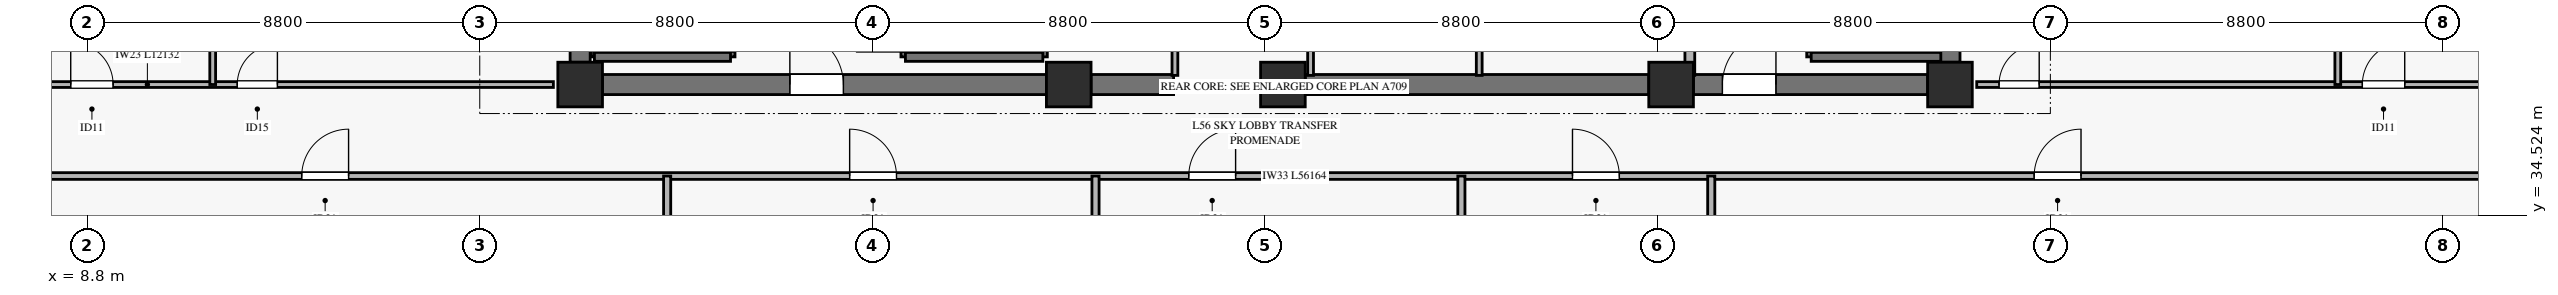
"""IFC4 building model, lengths in metres.
Left out: names, types, materials, properties, quantities, classifications, styles, units other than length and angle.
Written with IfcOpenShell. Run it as: python <this file> out.ifc"""

import sys

from ifc_helpers import new_model, si_unit, direction, frame, frame_2d, origin, origin_2d, place, context, subcontext, project, spatial, rectangle, extrude, source, transform, mapped, element, fill, save


model = new_model("IFC4")
c1 = context("Model", 3, precision=1e-05, world=origin(), true_north=direction((0.0, 1.0)))
c2 = subcontext(c1, "Body", "Model", "MODEL_VIEW")
j1 = project(units=[si_unit("LENGTHUNIT", "METRE"), si_unit("PLANEANGLEUNIT", "RADIAN")], contexts=[c1])
p1 = place(None, origin())
s1 = spatial("IfcSite", under=j1, at=p1, CompositionType="ELEMENT")
p2 = place(p1, origin())
s2 = spatial("IfcBuilding", under=s1, at=p2, CompositionType="ELEMENT")
p3 = place(p2, frame((0.0, 0.0, 220.2)))
s3 = spatial("IfcBuildingStorey", under=s2, at=p3, CompositionType="ELEMENT", Elevation=220.2)
m1 = source(origin(), c2, "Body", "SweptSolid", [
    extrude(rectangle(XDim=1.0, YDim=1.0, at=origin_2d()), origin(), (0.0, 0.0, 1.0), 6.585),
])
for number, where, z_axis, x_axis in (
    (1, (19.85, 37.45, 0.0), (0.0, 0.0, 1.0), (1.0, 0.0, 0.0)),
    (2, (30.8, 37.45, 0.0), (0.0, 0.0, 1.0), (1.0, 0.0, 0.0)),
    (3, (35.6, 37.45, 0.0), (0.0, 0.0, 1.0), (1.0, 0.0, 0.0)),
    (4, (44.3, 37.45, 0.0), (0.0, 0.0, 1.0), (1.0, 0.0, 0.0)),
    (5, (50.55, 37.45, 0.0), (0.0, 0.0, 1.0), (1.0, 0.0, 0.0)),
):
    element("IfcColumn", number, at=place(p3, frame(where, z_axis=z_axis, x_axis=x_axis)), inside=s3, PredefinedType="PILASTER", context=c2, shape_type="MappedRepresentation", body=[
        mapped(m1, transform((0.0, 0.0, 0.0), x_axis=(1.0, 0.0, 0.0), y_axis=(0.0, 1.0, 0.0), z_axis=(0.0, 0.0, 1.0), scale=1.0)),
    ])
p4 = place(p3, frame((20.35, 37.45, 0.0), z_axis=(0.0, 0.0, 1.0), x_axis=(1.0, 0.0, 0.0)))
e6 = element("IfcWall", 6, at=p4, inside=s3, PredefinedType="SHEAR", context=c2, shape_type="SweptSolid", body=[
    extrude(rectangle(XDim=9.95, YDim=0.45, at=frame_2d((4.975, 0.0))), origin(), (0.0, 0.0, 1.0), 6.585),
])
p5 = place(p4, frame((4.2, 0.0, 0.0)))
e7 = element("IfcOpeningElement", 7, at=p5, cuts=e6, PredefinedType="OPENING", context=c2, shape_type="SweptSolid", body=[
    extrude(rectangle(XDim=1.2, YDim=2.15, at=frame_2d((0.6, 1.075))), frame((0.0, 0.235, 0.0), z_axis=(0.0, -1.0, 0.0), x_axis=(1.0, 0.0, 0.0)), (0.0, 0.0, 1.0), 0.47),
])
p6 = place(p3, frame((31.3, 37.45, 0.0), z_axis=(0.0, 0.0, 1.0), x_axis=(1.0, 0.0, 0.0)))
e8 = element("IfcWall", 8, at=p6, inside=s3, PredefinedType="SHEAR", context=c2, shape_type="SweptSolid", body=[
    extrude(rectangle(XDim=1.85, YDim=0.45, at=frame_2d((0.925, 0.0))), origin(), (0.0, 0.0, 1.0), 6.585),
])
p7 = place(p3, frame((36.1, 37.45, 0.0), z_axis=(0.0, 0.0, 1.0), x_axis=(1.0, 0.0, 0.0)))
e9 = element("IfcWall", 9, at=p7, inside=s3, PredefinedType="SHEAR", context=c2, shape_type="SweptSolid", body=[
    extrude(rectangle(XDim=7.7, YDim=0.45, at=frame_2d((3.85, 0.0))), origin(), (0.0, 0.0, 1.0), 6.585),
])
p8 = place(p3, frame((44.8, 37.45, 0.0), z_axis=(0.0, 0.0, 1.0), x_axis=(1.0, 0.0, 0.0)))
e10 = element("IfcWall", 10, at=p8, inside=s3, PredefinedType="SHEAR", context=c2, shape_type="SweptSolid", body=[
    extrude(rectangle(XDim=5.25, YDim=0.45, at=frame_2d((2.625, 0.0))), origin(), (0.0, 0.0, 1.0), 6.585),
])
p9 = place(p8, frame((0.65, 0.0, 0.0)))
e11 = element("IfcOpeningElement", 11, at=p9, cuts=e10, PredefinedType="OPENING", context=c2, shape_type="SweptSolid", body=[
    extrude(rectangle(XDim=1.2, YDim=2.15, at=frame_2d((0.6, 1.075))), frame((0.0, 0.235, 0.0), z_axis=(0.0, -1.0, 0.0), x_axis=(1.0, 0.0, 0.0)), (0.0, 0.0, 1.0), 0.47),
])
for number, where, z_axis, x_axis in (
    (12, (19.85, 37.95, 0.0), (0.0, 0.0, 1.0), (0.0, 1.0, 0.0)),
    (13, (50.55, 37.95, 0.0), (0.0, 0.0, 1.0), (0.0, 1.0, 0.0)),
):
    element("IfcWall", number, at=place(p3, frame(where, z_axis=z_axis, x_axis=x_axis)), inside=s3, PredefinedType="SHEAR", context=c2, shape_type="SweptSolid", body=[
        extrude(rectangle(XDim=8.1, YDim=0.45, at=frame_2d((4.05, 0.0))), origin(), (0.0, 0.0, 1.0), 6.585),
    ])
p10 = place(p3, frame((20.17, 38.07, 0.0), z_axis=(0.0, 0.0, 1.0), x_axis=(0.0, 1.0, 0.0)))
e14 = element("IfcWall", 14, at=p10, inside=s3, PredefinedType="SOLIDWALL", context=c2, shape_type="SweptSolid", body=[
    extrude(rectangle(XDim=7.25, YDim=0.14, at=frame_2d((3.625, 0.0))), origin(), (0.0, 0.0, 1.0), 6.8),
])
p11 = place(p3, frame((23.22, 38.07, 0.0), z_axis=(0.0, 0.0, 1.0), x_axis=(0.0, 1.0, 0.0)))
e15 = element("IfcWall", 15, at=p11, inside=s3, PredefinedType="SOLIDWALL", context=c2, shape_type="SweptSolid", body=[
    extrude(rectangle(XDim=7.25, YDim=0.2, at=frame_2d((3.625, 0.0))), origin(), (0.0, 0.0, 1.0), 6.8),
])
p12 = place(p11, frame((0.11, 0.0, 0.0)))
e16 = element("IfcOpeningElement", 16, at=p12, cuts=e15, PredefinedType="OPENING", context=c2, shape_type="SweptSolid", body=[
    extrude(rectangle(XDim=1.1, YDim=2.15, at=frame_2d((0.55, 1.075))), frame((0.0, 0.11, 0.0), z_axis=(0.0, -1.0, 0.0), x_axis=(1.0, 0.0, 0.0)), (0.0, 0.0, 1.0), 0.22),
])
p13 = place(p3, frame((20.17, 38.07, 0.0), z_axis=(0.0, 0.0, 1.0), x_axis=(1.0, 0.0, 0.0)))
e17 = element("IfcWall", 17, at=p13, inside=s3, PredefinedType="SOLIDWALL", context=c2, shape_type="SweptSolid", body=[
    extrude(rectangle(XDim=3.05, YDim=0.2, at=frame_2d((1.525, 0.0))), origin(), (0.0, 0.0, 1.0), 6.8),
])
p14 = place(p3, frame((27.14, 38.07, 0.0), z_axis=(0.0, 0.0, 1.0), x_axis=(0.0, 1.0, 0.0)))
e18 = element("IfcWall", 18, at=p14, inside=s3, PredefinedType="SOLIDWALL", context=c2, shape_type="SweptSolid", body=[
    extrude(rectangle(XDim=7.25, YDim=0.2, at=frame_2d((3.625, 0.0))), origin(), (0.0, 0.0, 1.0), 6.8),
])
p15 = place(p14, frame((0.11, 0.0, 0.0)))
e19 = element("IfcOpeningElement", 19, at=p15, cuts=e18, PredefinedType="OPENING", context=c2, shape_type="SweptSolid", body=[
    extrude(rectangle(XDim=1.1, YDim=2.15, at=frame_2d((0.55, 1.075))), frame((0.0, 0.11, 0.0), z_axis=(0.0, -1.0, 0.0), x_axis=(1.0, 0.0, 0.0)), (0.0, 0.0, 1.0), 0.22),
])
p16 = place(p3, frame((30.22, 38.07, 0.0), z_axis=(0.0, 0.0, 1.0), x_axis=(0.0, 1.0, 0.0)))
e20 = element("IfcWall", 20, at=p16, inside=s3, PredefinedType="SOLIDWALL", context=c2, shape_type="SweptSolid", body=[
    extrude(rectangle(XDim=7.25, YDim=0.2, at=frame_2d((3.625, 0.0))), origin(), (0.0, 0.0, 1.0), 6.8),
])
p17 = place(p3, frame((27.14, 38.07, 0.0), z_axis=(0.0, 0.0, 1.0), x_axis=(1.0, 0.0, 0.0)))
e21 = element("IfcWall", 21, at=p17, inside=s3, PredefinedType="SOLIDWALL", context=c2, shape_type="SweptSolid", body=[
    extrude(rectangle(XDim=3.08, YDim=0.2, at=frame_2d((1.54, 0.0))), origin(), (0.0, 0.0, 1.0), 6.8),
])
p18 = place(p3, frame((47.44, 38.07, 0.0), z_axis=(0.0, 0.0, 1.0), x_axis=(0.0, 1.0, 0.0)))
e22 = element("IfcWall", 22, at=p18, inside=s3, PredefinedType="SOLIDWALL", context=c2, shape_type="SweptSolid", body=[
    extrude(rectangle(XDim=7.25, YDim=0.2, at=frame_2d((3.625, 0.0))), origin(), (0.0, 0.0, 1.0), 6.8),
])
p19 = place(p18, frame((0.11, 0.0, 0.0)))
e23 = element("IfcOpeningElement", 23, at=p19, cuts=e22, PredefinedType="OPENING", context=c2, shape_type="SweptSolid", body=[
    extrude(rectangle(XDim=1.1, YDim=2.15, at=frame_2d((0.55, 1.075))), frame((0.0, 0.11, 0.0), z_axis=(0.0, -1.0, 0.0), x_axis=(1.0, 0.0, 0.0)), (0.0, 0.0, 1.0), 0.22),
])
p20 = place(p3, frame((47.44, 38.07, 0.0), z_axis=(0.0, 0.0, 1.0), x_axis=(1.0, 0.0, 0.0)))
e24 = element("IfcWall", 24, at=p20, inside=s3, PredefinedType="SOLIDWALL", context=c2, shape_type="SweptSolid", body=[
    extrude(rectangle(XDim=2.905, YDim=0.2, at=frame_2d((1.453, 0.0))), origin(), (0.0, 0.0, 1.0), 6.8),
])
p21 = place(p3, frame((44.72, 37.655, 0.0), z_axis=(0.0, 0.0, 1.0), x_axis=(0.0, 1.0, 0.0)))
e25 = element("IfcWall", 25, at=p21, inside=s3, PredefinedType="SOLIDWALL", context=c2, shape_type="SweptSolid", body=[
    extrude(rectangle(XDim=7.565, YDim=0.22, at=frame_2d((3.782, 0.0))), origin(), (0.0, 0.0, 1.0), 6.585),
])
p22 = place(p3, frame((33.18, 37.655, 0.0), z_axis=(0.0, 0.0, 1.0), x_axis=(0.0, 1.0, 0.0)))
e26 = element("IfcWall", 26, at=p22, inside=s3, PredefinedType="PARTITIONING", context=c2, shape_type="SweptSolid", body=[
    extrude(rectangle(XDim=6.495, YDim=0.13, at=frame_2d((3.248, 0.0))), origin(), (0.0, 0.0, 1.0), 5.67),
])
p23 = place(p22, frame((2.245, 0.0, 0.0)))
e27 = element("IfcOpeningElement", 27, at=p23, cuts=e26, PredefinedType="OPENING", context=c2, shape_type="SweptSolid", body=[
    extrude(rectangle(XDim=0.9, YDim=2.1, at=frame_2d((0.45, 1.05))), frame((0.0, 0.075, 0.0), z_axis=(0.0, -1.0, 0.0), x_axis=(1.0, 0.0, 0.0)), (0.0, 0.0, 1.0), 0.15),
])
p24 = place(p3, frame((36.22, 37.655, 0.0), z_axis=(0.0, 0.0, 1.0), x_axis=(0.0, 1.0, 0.0)))
e28 = element("IfcWall", 28, at=p24, inside=s3, PredefinedType="PARTITIONING", context=c2, shape_type="SweptSolid", body=[
    extrude(rectangle(XDim=2.265, YDim=0.13, at=frame_2d((1.132, 0.0))), origin(), (0.0, 0.0, 1.0), 6.585),
])
p25 = place(p24, frame((0.905, 0.0, 0.0)))
e29 = element("IfcOpeningElement", 29, at=p25, cuts=e28, PredefinedType="OPENING", context=c2, shape_type="SweptSolid", body=[
    extrude(rectangle(XDim=0.9, YDim=2.1, at=frame_2d((0.45, 1.05))), frame((0.0, 0.075, 0.0), z_axis=(0.0, -1.0, 0.0), x_axis=(1.0, 0.0, 0.0)), (0.0, 0.0, 1.0), 0.15),
])
p26 = place(p3, frame((40.0, 37.655, 0.0), z_axis=(0.0, 0.0, 1.0), x_axis=(0.0, 1.0, 0.0)))
e30 = element("IfcWall", 30, at=p26, inside=s3, PredefinedType="PARTITIONING", context=c2, shape_type="SweptSolid", body=[
    extrude(rectangle(XDim=2.265, YDim=0.13, at=frame_2d((1.132, 0.0))), origin(), (0.0, 0.0, 1.0), 6.585),
])
p27 = place(p26, frame((0.665, 0.0, 0.0)))
e31 = element("IfcOpeningElement", 31, at=p27, cuts=e30, PredefinedType="OPENING", context=c2, shape_type="SweptSolid", body=[
    extrude(rectangle(XDim=0.9, YDim=2.1, at=frame_2d((0.45, 1.05))), frame((0.0, 0.075, 0.0), z_axis=(0.0, -1.0, 0.0), x_axis=(1.0, 0.0, 0.0)), (0.0, 0.0, 1.0), 0.15),
])
p28 = place(p3, frame((7.118, 35.4, 0.0), z_axis=(0.0, 0.0, 1.0), x_axis=(1.0, 0.0, 0.0)))
e32 = element("IfcWall", 32, at=p28, inside=s3, PredefinedType="PARTITIONING", context=c2, shape_type="SweptSolid", body=[
    extrude(rectangle(XDim=56.164, YDim=0.15, at=frame_2d((28.082, 0.0))), origin(), (0.0, 0.0, 1.0), 5.77),
])
p29 = place(p28, frame((6.492, 0.0, 0.0)))
e33 = element("IfcOpeningElement", 33, at=p29, cuts=e32, PredefinedType="OPENING", context=c2, shape_type="SweptSolid", body=[
    extrude(rectangle(XDim=1.05, YDim=2.15, at=frame_2d((0.525, 1.075))), frame((0.0, 0.085, 0.0), z_axis=(0.0, -1.0, 0.0), x_axis=(1.0, 0.0, 0.0)), (0.0, 0.0, 1.0), 0.17),
])
p30 = place(p28, frame((18.772, 0.0, 0.0)))
e34 = element("IfcOpeningElement", 34, at=p30, cuts=e32, PredefinedType="OPENING", context=c2, shape_type="SweptSolid", body=[
    extrude(rectangle(XDim=1.05, YDim=2.15, at=frame_2d((0.525, 1.075))), frame((0.0, 0.085, 0.0), z_axis=(0.0, -1.0, 0.0), x_axis=(1.0, 0.0, 0.0)), (0.0, 0.0, 1.0), 0.17),
])
p31 = place(p28, frame((26.372, 0.0, 0.0)))
e35 = element("IfcOpeningElement", 35, at=p31, cuts=e32, PredefinedType="OPENING", context=c2, shape_type="SweptSolid", body=[
    extrude(rectangle(XDim=1.05, YDim=2.15, at=frame_2d((0.525, 1.075))), frame((0.0, 0.085, 0.0), z_axis=(0.0, -1.0, 0.0), x_axis=(1.0, 0.0, 0.0)), (0.0, 0.0, 1.0), 0.17),
])
p32 = place(p28, frame((34.972, 0.0, 0.0)))
e36 = element("IfcOpeningElement", 36, at=p32, cuts=e32, PredefinedType="OPENING", context=c2, shape_type="SweptSolid", body=[
    extrude(rectangle(XDim=1.05, YDim=2.15, at=frame_2d((0.525, 1.075))), frame((0.0, 0.085, 0.0), z_axis=(0.0, -1.0, 0.0), x_axis=(1.0, 0.0, 0.0)), (0.0, 0.0, 1.0), 0.17),
])
p33 = place(p28, frame((45.319, 0.0, 0.0)))
e37 = element("IfcOpeningElement", 37, at=p33, cuts=e32, PredefinedType="OPENING", context=c2, shape_type="SweptSolid", body=[
    extrude(rectangle(XDim=1.05, YDim=2.15, at=frame_2d((0.525, 1.075))), frame((0.0, 0.085, 0.0), z_axis=(0.0, -1.0, 0.0), x_axis=(1.0, 0.0, 0.0)), (0.0, 0.0, 1.0), 0.17),
])
for number, where, z_axis, x_axis in (
    (38, (21.8, 12.318, 0.0), (0.0, 0.0, 1.0), (0.0, 1.0, 0.0)),
    (39, (31.4, 12.318, 0.0), (0.0, 0.0, 1.0), (0.0, 1.0, 0.0)),
    (40, (39.6, 12.318, 0.0), (0.0, 0.0, 1.0), (0.0, 1.0, 0.0)),
    (41, (45.2, 12.318, 0.0), (0.0, 0.0, 1.0), (0.0, 1.0, 0.0)),
):
    element("IfcWall", number, at=place(p3, frame(where, z_axis=z_axis, x_axis=x_axis)), inside=s3, PredefinedType="PARTITIONING", context=c2, shape_type="SweptSolid", body=[
        extrude(rectangle(XDim=23.082, YDim=0.16, at=frame_2d((11.541, 0.0))), origin(), (0.0, 0.0, 1.0), 6.07),
    ])
p34 = place(p3, frame((7.118, 37.45, 0.0), z_axis=(0.0, 0.0, 1.0), x_axis=(1.0, 0.0, 0.0)))
e42 = element("IfcWall", 42, at=p34, inside=s3, PredefinedType="PARTITIONING", context=c2, shape_type="SweptSolid", body=[
    extrude(rectangle(XDim=12.132, YDim=0.13, at=frame_2d((6.066, 0.0))), origin(), (0.0, 0.0, 1.0), 6.07),
])
p35 = place(p34, frame((1.315, 0.0, 0.0)))
e43 = element("IfcOpeningElement", 43, at=p35, cuts=e42, PredefinedType="OPENING", context=c2, shape_type="SweptSolid", body=[
    extrude(rectangle(XDim=0.95, YDim=2.1, at=frame_2d((0.475, 1.05))), frame((0.0, 0.075, 0.0), z_axis=(0.0, -1.0, 0.0), x_axis=(1.0, 0.0, 0.0)), (0.0, 0.0, 1.0), 0.15),
])
p36 = place(p34, frame((5.047, 0.0, 0.0)))
e44 = element("IfcOpeningElement", 44, at=p36, cuts=e42, PredefinedType="OPENING", context=c2, shape_type="SweptSolid", body=[
    extrude(rectangle(XDim=0.9, YDim=2.1, at=frame_2d((0.45, 1.05))), frame((0.0, 0.075, 0.0), z_axis=(0.0, -1.0, 0.0), x_axis=(1.0, 0.0, 0.0)), (0.0, 0.0, 1.0), 0.15),
])
p37 = place(p3, frame((11.615, 37.45, 0.0), z_axis=(0.0, 0.0, 1.0), x_axis=(0.0, 1.0, 0.0)))
e45 = element("IfcWall", 45, at=p37, inside=s3, PredefinedType="PARTITIONING", context=c2, shape_type="SweptSolid", body=[
    extrude(rectangle(XDim=8.8, YDim=0.13, at=frame_2d((4.4, 0.0))), origin(), (0.0, 0.0, 1.0), 6.585),
])
p38 = place(p3, frame((51.15, 37.45, 0.0), z_axis=(0.0, 0.0, 1.0), x_axis=(1.0, 0.0, 0.0)))
e46 = element("IfcWall", 46, at=p38, inside=s3, PredefinedType="PARTITIONING", context=c2, shape_type="SweptSolid", body=[
    extrude(rectangle(XDim=12.132, YDim=0.13, at=frame_2d((6.066, 0.0))), origin(), (0.0, 0.0, 1.0), 6.07),
])
p39 = place(p38, frame((0.5, 0.0, 0.0)))
e47 = element("IfcOpeningElement", 47, at=p39, cuts=e46, PredefinedType="OPENING", context=c2, shape_type="SweptSolid", body=[
    extrude(rectangle(XDim=0.9, YDim=2.1, at=frame_2d((0.45, 1.05))), frame((0.0, 0.075, 0.0), z_axis=(0.0, -1.0, 0.0), x_axis=(1.0, 0.0, 0.0)), (0.0, 0.0, 1.0), 0.15),
])
p40 = place(p38, frame((8.642, 0.0, 0.0)))
e48 = element("IfcOpeningElement", 48, at=p40, cuts=e46, PredefinedType="OPENING", context=c2, shape_type="SweptSolid", body=[
    extrude(rectangle(XDim=0.95, YDim=2.1, at=frame_2d((0.475, 1.05))), frame((0.0, 0.075, 0.0), z_axis=(0.0, -1.0, 0.0), x_axis=(1.0, 0.0, 0.0)), (0.0, 0.0, 1.0), 0.15),
])
p41 = place(p3, frame((59.242, 37.45, 0.0), z_axis=(0.0, 0.0, 1.0), x_axis=(0.0, 1.0, 0.0)))
e49 = element("IfcWall", 49, at=p41, inside=s3, PredefinedType="PARTITIONING", context=c2, shape_type="SweptSolid", body=[
    extrude(rectangle(XDim=8.8, YDim=0.13, at=frame_2d((4.4, 0.0))), origin(), (0.0, 0.0, 1.0), 6.07),
])
m2 = source(origin(), c2, "Body", "SweptSolid", [
    extrude(rectangle(XDim=1.2, YDim=2.15, at=frame_2d((0.6, 1.075))), frame((0.0, 0.025, 0.0), z_axis=(0.0, -1.0, 0.0), x_axis=(1.0, 0.0, 0.0)), (0.0, 0.0, 1.0), 0.05),
])
p42 = place(p5, origin())
e50 = element("IfcDoor", 50, at=p42, inside=s3, OperationType="SINGLE_SWING_LEFT", PredefinedType="DOOR", context=c2, shape_type="MappedRepresentation", body=[
    mapped(m2, transform((0.0, 0.0, 0.0), x_axis=(1.0, 0.0, 0.0), y_axis=(0.0, 1.0, 0.0), z_axis=(0.0, 0.0, 1.0), scale=1.0)),
])
fill(e7, e50)
p43 = place(p9, origin())
e51 = element("IfcDoor", 51, at=p43, inside=s3, OperationType="SINGLE_SWING_RIGHT", PredefinedType="DOOR", context=c2, shape_type="MappedRepresentation", body=[
    mapped(m2, transform((0.0, 0.0, 0.0), x_axis=(1.0, 0.0, 0.0), y_axis=(0.0, 1.0, 0.0), z_axis=(0.0, 0.0, 1.0), scale=1.0)),
])
fill(e11, e51)
m3 = source(origin(), c2, "Body", "SweptSolid", [
    extrude(rectangle(XDim=1.05, YDim=2.15, at=frame_2d((0.525, 1.075))), frame((0.0, 0.025, 0.0), z_axis=(0.0, -1.0, 0.0), x_axis=(1.0, 0.0, 0.0)), (0.0, 0.0, 1.0), 0.05),
])
p44 = place(p29, origin())
e52 = element("IfcDoor", 52, at=p44, inside=s3, OperationType="SINGLE_SWING_RIGHT", PredefinedType="DOOR", context=c2, shape_type="MappedRepresentation", body=[
    mapped(m3, transform((0.0, 0.0, 0.0), x_axis=(1.0, 0.0, 0.0), y_axis=(0.0, 1.0, 0.0), z_axis=(0.0, 0.0, 1.0), scale=1.0)),
])
fill(e33, e52)
p45 = place(p30, origin())
e53 = element("IfcDoor", 53, at=p45, inside=s3, OperationType="SINGLE_SWING_LEFT", PredefinedType="DOOR", context=c2, shape_type="MappedRepresentation", body=[
    mapped(m3, transform((0.0, 0.0, 0.0), x_axis=(1.0, 0.0, 0.0), y_axis=(0.0, 1.0, 0.0), z_axis=(0.0, 0.0, 1.0), scale=1.0)),
])
fill(e34, e53)
p46 = place(p31, origin())
e54 = element("IfcDoor", 54, at=p46, inside=s3, OperationType="SINGLE_SWING_RIGHT", PredefinedType="DOOR", context=c2, shape_type="MappedRepresentation", body=[
    mapped(m3, transform((0.0, 0.0, 0.0), x_axis=(1.0, 0.0, 0.0), y_axis=(0.0, 1.0, 0.0), z_axis=(0.0, 0.0, 1.0), scale=1.0)),
])
fill(e35, e54)
p47 = place(p32, origin())
e55 = element("IfcDoor", 55, at=p47, inside=s3, OperationType="SINGLE_SWING_LEFT", PredefinedType="DOOR", context=c2, shape_type="MappedRepresentation", body=[
    mapped(m3, transform((0.0, 0.0, 0.0), x_axis=(1.0, 0.0, 0.0), y_axis=(0.0, 1.0, 0.0), z_axis=(0.0, 0.0, 1.0), scale=1.0)),
])
fill(e36, e55)
p48 = place(p33, origin())
e56 = element("IfcDoor", 56, at=p48, inside=s3, OperationType="SINGLE_SWING_RIGHT", PredefinedType="DOOR", context=c2, shape_type="MappedRepresentation", body=[
    mapped(m3, transform((0.0, 0.0, 0.0), x_axis=(1.0, 0.0, 0.0), y_axis=(0.0, 1.0, 0.0), z_axis=(0.0, 0.0, 1.0), scale=1.0)),
])
fill(e37, e56)
m4 = source(origin(), c2, "Body", "SweptSolid", [
    extrude(rectangle(XDim=0.95, YDim=2.1, at=frame_2d((0.475, 1.05))), frame((0.0, 0.025, 0.0), z_axis=(0.0, -1.0, 0.0), x_axis=(1.0, 0.0, 0.0)), (0.0, 0.0, 1.0), 0.05),
])
p49 = place(p35, origin())
e57 = element("IfcDoor", 57, at=p49, inside=s3, OperationType="SINGLE_SWING_LEFT", PredefinedType="DOOR", context=c2, shape_type="MappedRepresentation", body=[
    mapped(m4, transform((0.0, 0.0, 0.0), x_axis=(1.0, 0.0, 0.0), y_axis=(0.0, 1.0, 0.0), z_axis=(0.0, 0.0, 1.0), scale=1.0)),
])
fill(e43, e57)
m5 = source(origin(), c2, "Body", "SweptSolid", [
    extrude(rectangle(XDim=0.9, YDim=2.1, at=frame_2d((0.45, 1.05))), frame((0.0, 0.025, 0.0), z_axis=(0.0, -1.0, 0.0), x_axis=(1.0, 0.0, 0.0)), (0.0, 0.0, 1.0), 0.05),
])
p50 = place(p36, origin())
e58 = element("IfcDoor", 58, at=p50, inside=s3, OperationType="SINGLE_SWING_RIGHT", PredefinedType="DOOR", context=c2, shape_type="MappedRepresentation", body=[
    mapped(m5, transform((0.0, 0.0, 0.0), x_axis=(1.0, 0.0, 0.0), y_axis=(0.0, 1.0, 0.0), z_axis=(0.0, 0.0, 1.0), scale=1.0)),
])
fill(e44, e58)
p51 = place(p39, origin())
e59 = element("IfcDoor", 59, at=p51, inside=s3, OperationType="SINGLE_SWING_RIGHT", PredefinedType="DOOR", context=c2, shape_type="MappedRepresentation", body=[
    mapped(m5, transform((0.0, 0.0, 0.0), x_axis=(1.0, 0.0, 0.0), y_axis=(0.0, 1.0, 0.0), z_axis=(0.0, 0.0, 1.0), scale=1.0)),
])
fill(e47, e59)
p52 = place(p40, origin())
e60 = element("IfcDoor", 60, at=p52, inside=s3, OperationType="SINGLE_SWING_RIGHT", PredefinedType="DOOR", context=c2, shape_type="MappedRepresentation", body=[
    mapped(m4, transform((0.0, 0.0, 0.0), x_axis=(1.0, 0.0, 0.0), y_axis=(0.0, 1.0, 0.0), z_axis=(0.0, 0.0, 1.0), scale=1.0)),
])
fill(e48, e60)
save(model, sys.argv[1])
